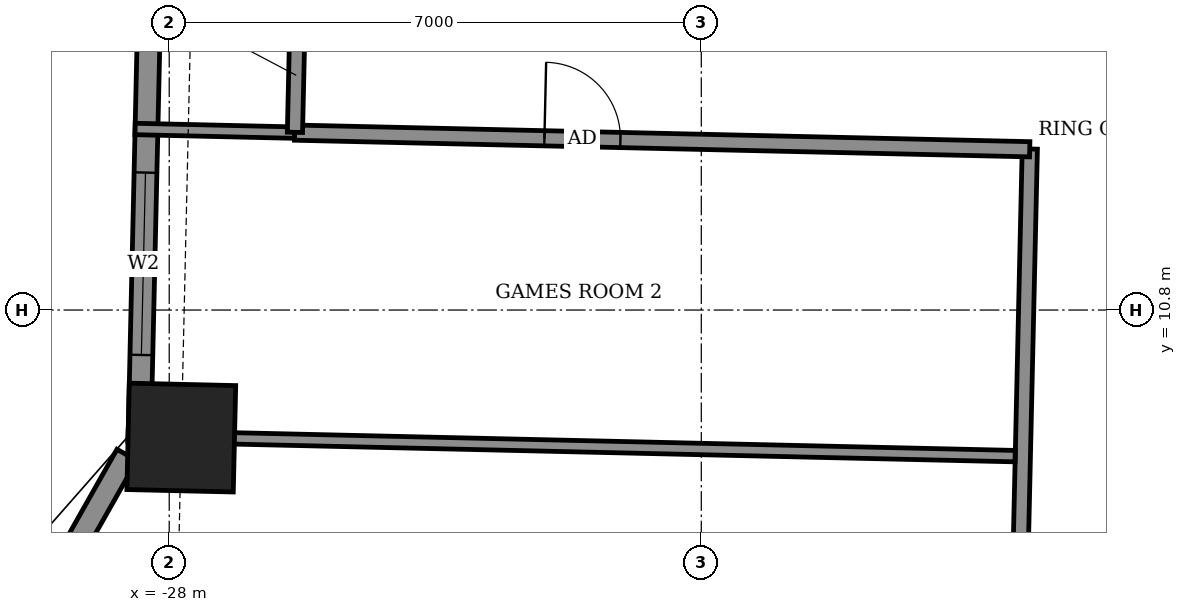
"""IFC4 building model, lengths in metres.
Left out: names, types, materials, properties, quantities, classifications, styles, units other than length and angle.
Written with IfcOpenShell. Run it as: python <this file> out.ifc"""

import sys

from ifc_helpers import new_model, si_unit, direction, frame, frame_2d, origin, origin_2d, place, context, subcontext, project, spatial, rectangle, extrude, element, fill, save


model = new_model("IFC4")
c1 = context("Model", 3, precision=1e-05, world=origin(), true_north=direction((0.0, 1.0)))
c2 = subcontext(c1, "Body", "Model", "MODEL_VIEW")
j1 = project(units=[si_unit("LENGTHUNIT", "METRE"), si_unit("PLANEANGLEUNIT", "RADIAN")], contexts=[c1])
p1 = place(None, origin())
s1 = spatial("IfcSite", under=j1, at=p1, CompositionType="ELEMENT")
p2 = place(p1, origin())
s2 = spatial("IfcBuilding", under=s1, at=p2, CompositionType="ELEMENT")
p3 = place(p2, frame((0.0, 0.0, 109.1)))
s3 = spatial("IfcBuildingStorey", under=s2, at=p3, CompositionType="ELEMENT", Elevation=109.1)
p4 = place(p3, frame((-27.841, 9.122, -0.55), z_axis=(0.0, 0.0, 1.0), x_axis=(-0.022671716894, -0.999742963593, 0.0)))
e1 = element("IfcColumn", 1, at=p4, inside=s3, PredefinedType="COLUMN", context=c2, shape_type="SweptSolid", body=[
    extrude(rectangle(XDim=1.4, YDim=1.4, at=origin_2d()), origin(), (0.0, 0.0, 1.0), 3.6),
])
p5 = place(p3, frame((-28.106, 21.707, 0.0), z_axis=(0.0, 0.0, 1.0), x_axis=(-0.022654663697, -0.999743350172, 0.0)))
e2 = element("IfcWall", 2, at=p5, inside=s3, PredefinedType="SOLIDWALL", context=c2, shape_type="SweptSolid", body=[
    extrude(rectangle(XDim=12.63, YDim=0.3, at=frame_2d((6.315, 0.0))), origin(), (0.0, 0.0, 1.0), 3.05),
])
p6 = place(p5, frame((2.625, 0.0, 0.0)))
e3 = element("IfcOpeningElement", 3, at=p6, cuts=e2, PredefinedType="OPENING", context=c2, shape_type="SweptSolid", body=[
    extrude(rectangle(XDim=1.5, YDim=2.4, at=frame_2d((0.75, 1.2))), frame((0.0, 0.16, 0.0), z_axis=(0.0, -1.0, 0.0), x_axis=(1.0, 0.0, 0.0)), (0.0, 0.0, 1.0), 0.32),
])
p7 = place(p5, frame((9.101, 0.0, 0.9)))
e4 = element("IfcOpeningElement", 4, at=p7, cuts=e2, PredefinedType="OPENING", context=c2, shape_type="SweptSolid", body=[
    extrude(rectangle(XDim=2.4, YDim=1.5, at=frame_2d((1.2, 0.75))), frame((0.0, 0.16, 0.0), z_axis=(0.0, -1.0, 0.0), x_axis=(1.0, 0.0, 0.0)), (0.0, 0.0, 1.0), 0.32),
])
p8 = place(p3, frame((-28.557, 8.894, 0.0), z_axis=(0.0, 0.0, 1.0), x_axis=(-0.492589172415, -0.8702619762, 0.0)))
e5 = element("IfcWall", 5, at=p8, inside=s3, PredefinedType="SOLIDWALL", context=c2, shape_type="SweptSolid", body=[
    extrude(rectangle(XDim=5.398, YDim=0.3, at=frame_2d((2.699, 0.0))), origin(), (0.0, 0.0, 1.0), 3.05),
])
p9 = place(p8, frame((2.008, 0.0, 0.9)))
e6 = element("IfcOpeningElement", 6, at=p9, cuts=e5, PredefinedType="OPENING", context=c2, shape_type="SweptSolid", body=[
    extrude(rectangle(XDim=1.2, YDim=1.5, at=frame_2d((0.6, 0.75))), frame((0.0, 0.16, 0.0), z_axis=(0.0, -1.0, 0.0), x_axis=(1.0, 0.0, 0.0)), (0.0, 0.0, 1.0), 0.32),
])
p10 = place(p3, frame((-17.247, -12.149, 0.0), z_axis=(0.0, 0.0, 1.0), x_axis=(0.022696191528, 0.999742408268, 0.0)))
e7 = element("IfcWall", 7, at=p10, inside=s3, PredefinedType="PARTITIONING", context=c2, shape_type="SweptSolid", body=[
    extrude(rectangle(XDim=25.074, YDim=0.2, at=frame_2d((12.537, 0.0))), origin(), (0.0, 0.0, 1.0), 3.05),
])
p11 = place(p10, frame((17.604, 0.0, 0.0)))
e8 = element("IfcOpeningElement", 8, at=p11, cuts=e7, PredefinedType="OPENING", context=c2, shape_type="SweptSolid", body=[
    extrude(rectangle(XDim=1.0, YDim=2.1, at=frame_2d((0.5, 1.05))), frame((0.0, 0.11, 0.0), z_axis=(0.0, -1.0, 0.0), x_axis=(1.0, 0.0, 0.0)), (0.0, 0.0, 1.0), 0.22),
])
p12 = place(p10, frame((13.376, 0.0, 0.0)))
e9 = element("IfcOpeningElement", 9, at=p12, cuts=e7, PredefinedType="OPENING", context=c2, shape_type="SweptSolid", body=[
    extrude(rectangle(XDim=1.0, YDim=2.1, at=frame_2d((0.5, 1.05))), frame((0.0, 0.11, 0.0), z_axis=(0.0, -1.0, 0.0), x_axis=(1.0, 0.0, 0.0)), (0.0, 0.0, 1.0), 0.22),
])
p13 = place(p10, frame((10.725, 0.0, 0.0)))
e10 = element("IfcOpeningElement", 10, at=p13, cuts=e7, PredefinedType="OPENING", context=c2, shape_type="SweptSolid", body=[
    extrude(rectangle(XDim=1.0, YDim=2.1, at=frame_2d((0.5, 1.05))), frame((0.0, 0.11, 0.0), z_axis=(0.0, -1.0, 0.0), x_axis=(1.0, 0.0, 0.0)), (0.0, 0.0, 1.0), 0.22),
])
p14 = place(p10, frame((8.225, 0.0, 0.0)))
e11 = element("IfcOpeningElement", 11, at=p14, cuts=e7, PredefinedType="OPENING", context=c2, shape_type="SweptSolid", body=[
    extrude(rectangle(XDim=0.9, YDim=2.1, at=frame_2d((0.45, 1.05))), frame((0.0, 0.11, 0.0), z_axis=(0.0, -1.0, 0.0), x_axis=(1.0, 0.0, 0.0)), (0.0, 0.0, 1.0), 0.22),
])
p15 = place(p10, frame((5.262, 0.0, 0.0)))
e12 = element("IfcOpeningElement", 12, at=p15, cuts=e7, PredefinedType="OPENING", context=c2, shape_type="SweptSolid", body=[
    extrude(rectangle(XDim=1.0, YDim=2.1, at=frame_2d((0.5, 1.05))), frame((0.0, 0.11, 0.0), z_axis=(0.0, -1.0, 0.0), x_axis=(1.0, 0.0, 0.0)), (0.0, 0.0, 1.0), 0.22),
])
p16 = place(p3, frame((-28.541, 9.143, 0.0), z_axis=(0.0, 0.0, 1.0), x_axis=(0.999742008279, -0.022713803786, 0.0)))
e13 = element("IfcWall", 13, at=p16, inside=s3, PredefinedType="PARTITIONING", context=c2, shape_type="SweptSolid", body=[
    extrude(rectangle(XDim=11.673, YDim=0.15, at=frame_2d((5.836, 0.0))), origin(), (0.0, 0.0, 1.0), 3.05),
])
p17 = place(p3, frame((-28.449, 13.182, 0.0), z_axis=(0.0, 0.0, 1.0), x_axis=(0.999741236023, -0.022747769011, 0.0)))
e14 = element("IfcWall", 14, at=p17, inside=s3, PredefinedType="PARTITIONING", context=c2, shape_type="SweptSolid", body=[
    extrude(rectangle(XDim=2.104, YDim=0.15, at=frame_2d((1.052, 0.0))), origin(), (0.0, 0.0, 1.0), 2.55),
])
p18 = place(p3, frame((-26.35, 13.134, 0.0), z_axis=(0.0, 0.0, 1.0), x_axis=(0.999743721339, -0.022638278294, 0.0)))
e15 = element("IfcWall", 15, at=p18, inside=s3, PredefinedType="PARTITIONING", context=c2, shape_type="SweptSolid", body=[
    extrude(rectangle(XDim=9.674, YDim=0.2, at=frame_2d((4.837, 0.0))), origin(), (0.0, 0.0, 1.0), 3.05),
])
p19 = place(p18, frame((3.287, 0.0, 0.0)))
e16 = element("IfcOpeningElement", 16, at=p19, cuts=e15, PredefinedType="OPENING", context=c2, shape_type="SweptSolid", body=[
    extrude(rectangle(XDim=1.0, YDim=2.1, at=frame_2d((0.5, 1.05))), frame((0.0, 0.11, 0.0), z_axis=(0.0, -1.0, 0.0), x_axis=(1.0, 0.0, 0.0)), (0.0, 0.0, 1.0), 0.22),
])
p20 = place(p3, frame((-26.346, 13.138, 0.0), z_axis=(0.0, 0.0, 1.0), x_axis=(0.022617910375, 0.999744182344, 0.0)))
e17 = element("IfcWall", 17, at=p20, inside=s3, PredefinedType="PARTITIONING", context=c2, shape_type="SweptSolid", body=[
    extrude(rectangle(XDim=1.5, YDim=0.2, at=frame_2d((0.75, 0.0))), origin(), (0.0, 0.0, 1.0), 3.05),
])
p21 = place(p3, frame((-26.316, 14.634, 0.0), z_axis=(0.0, 0.0, 1.0), x_axis=(0.999742734556, -0.02268181435, 0.0)))
e18 = element("IfcWall", 18, at=p21, inside=s3, PredefinedType="PARTITIONING", context=c2, shape_type="SweptSolid", body=[
    extrude(rectangle(XDim=50.708, YDim=0.2, at=frame_2d((25.354, 0.0))), origin(), (0.0, 0.0, 1.0), 3.05),
])
p22 = place(p21, frame((48.229, 0.0, 0.0)))
e19 = element("IfcOpeningElement", 19, at=p22, cuts=e18, PredefinedType="OPENING", context=c2, shape_type="SweptSolid", body=[
    extrude(rectangle(XDim=1.0, YDim=2.1, at=frame_2d((0.5, 1.05))), frame((0.0, 0.11, 0.0), z_axis=(0.0, -1.0, 0.0), x_axis=(1.0, 0.0, 0.0)), (0.0, 0.0, 1.0), 0.22),
])
p23 = place(p21, frame((43.6, 0.0, 0.0)))
e20 = element("IfcOpeningElement", 20, at=p23, cuts=e18, PredefinedType="OPENING", context=c2, shape_type="SweptSolid", body=[
    extrude(rectangle(XDim=0.9, YDim=2.1, at=frame_2d((0.45, 1.05))), frame((0.0, 0.11, 0.0), z_axis=(0.0, -1.0, 0.0), x_axis=(1.0, 0.0, 0.0)), (0.0, 0.0, 1.0), 0.22),
])
p24 = place(p21, frame((38.925, 0.0, 0.0)))
e21 = element("IfcOpeningElement", 21, at=p24, cuts=e18, PredefinedType="OPENING", context=c2, shape_type="SweptSolid", body=[
    extrude(rectangle(XDim=0.9, YDim=2.1, at=frame_2d((0.45, 1.05))), frame((0.0, 0.11, 0.0), z_axis=(0.0, -1.0, 0.0), x_axis=(1.0, 0.0, 0.0)), (0.0, 0.0, 1.0), 0.22),
])
p25 = place(p21, frame((36.9, 0.0, 0.0)))
e22 = element("IfcOpeningElement", 22, at=p25, cuts=e18, PredefinedType="OPENING", context=c2, shape_type="SweptSolid", body=[
    extrude(rectangle(XDim=0.9, YDim=2.1, at=frame_2d((0.45, 1.05))), frame((0.0, 0.11, 0.0), z_axis=(0.0, -1.0, 0.0), x_axis=(1.0, 0.0, 0.0)), (0.0, 0.0, 1.0), 0.22),
])
p26 = place(p21, frame((29.975, 0.0, 0.0)))
e23 = element("IfcOpeningElement", 23, at=p26, cuts=e18, PredefinedType="OPENING", context=c2, shape_type="SweptSolid", body=[
    extrude(rectangle(XDim=0.9, YDim=2.1, at=frame_2d((0.45, 1.05))), frame((0.0, 0.11, 0.0), z_axis=(0.0, -1.0, 0.0), x_axis=(1.0, 0.0, 0.0)), (0.0, 0.0, 1.0), 0.22),
])
p27 = place(p21, frame((27.9, 0.0, 0.0)))
e24 = element("IfcOpeningElement", 24, at=p27, cuts=e18, PredefinedType="OPENING", context=c2, shape_type="SweptSolid", body=[
    extrude(rectangle(XDim=0.9, YDim=2.1, at=frame_2d((0.45, 1.05))), frame((0.0, 0.11, 0.0), z_axis=(0.0, -1.0, 0.0), x_axis=(1.0, 0.0, 0.0)), (0.0, 0.0, 1.0), 0.22),
])
p28 = place(p21, frame((21.175, 0.0, 0.0)))
e25 = element("IfcOpeningElement", 25, at=p28, cuts=e18, PredefinedType="OPENING", context=c2, shape_type="SweptSolid", body=[
    extrude(rectangle(XDim=0.9, YDim=2.1, at=frame_2d((0.45, 1.05))), frame((0.0, 0.11, 0.0), z_axis=(0.0, -1.0, 0.0), x_axis=(1.0, 0.0, 0.0)), (0.0, 0.0, 1.0), 0.22),
])
p29 = place(p21, frame((19.25, 0.0, 0.0)))
e26 = element("IfcOpeningElement", 26, at=p29, cuts=e18, PredefinedType="OPENING", context=c2, shape_type="SweptSolid", body=[
    extrude(rectangle(XDim=0.9, YDim=2.1, at=frame_2d((0.45, 1.05))), frame((0.0, 0.11, 0.0), z_axis=(0.0, -1.0, 0.0), x_axis=(1.0, 0.0, 0.0)), (0.0, 0.0, 1.0), 0.22),
])
p30 = place(p21, frame((12.375, 0.0, 0.0)))
e27 = element("IfcOpeningElement", 27, at=p30, cuts=e18, PredefinedType="OPENING", context=c2, shape_type="SweptSolid", body=[
    extrude(rectangle(XDim=0.9, YDim=2.1, at=frame_2d((0.45, 1.05))), frame((0.0, 0.11, 0.0), z_axis=(0.0, -1.0, 0.0), x_axis=(1.0, 0.0, 0.0)), (0.0, 0.0, 1.0), 0.22),
])
p31 = place(p21, frame((10.225, 0.0, 0.0)))
e28 = element("IfcOpeningElement", 28, at=p31, cuts=e18, PredefinedType="OPENING", context=c2, shape_type="SweptSolid", body=[
    extrude(rectangle(XDim=0.9, YDim=2.1, at=frame_2d((0.45, 1.05))), frame((0.0, 0.11, 0.0), z_axis=(0.0, -1.0, 0.0), x_axis=(1.0, 0.0, 0.0)), (0.0, 0.0, 1.0), 0.22),
])
p32 = place(p21, frame((0.85, 0.0, 0.0)))
e29 = element("IfcOpeningElement", 29, at=p32, cuts=e18, PredefinedType="OPENING", context=c2, shape_type="SweptSolid", body=[
    extrude(rectangle(XDim=1.0, YDim=2.1, at=frame_2d((0.5, 1.05))), frame((0.0, 0.11, 0.0), z_axis=(0.0, -1.0, 0.0), x_axis=(1.0, 0.0, 0.0)), (0.0, 0.0, 1.0), 0.22),
])
p33 = place(p21, frame((5.55, 0.0, 0.0)))
e30 = element("IfcOpeningElement", 30, at=p33, cuts=e18, PredefinedType="OPENING", context=c2, shape_type="SweptSolid", body=[
    extrude(rectangle(XDim=0.9, YDim=2.1, at=frame_2d((0.45, 1.05))), frame((0.0, 0.11, 0.0), z_axis=(0.0, -1.0, 0.0), x_axis=(1.0, 0.0, 0.0)), (0.0, 0.0, 1.0), 0.22),
])
p34 = place(p7, origin())
e31 = element("IfcWindow", 31, at=p34, inside=s3, PartitioningType="DOUBLE_PANEL_VERTICAL", PredefinedType="WINDOW", context=c2, shape_type="SweptSolid", body=[
    extrude(rectangle(XDim=2.4, YDim=1.5, at=frame_2d((1.2, 0.75))), frame((0.0, 0.03, 0.0), z_axis=(0.0, -1.0, 0.0), x_axis=(1.0, 0.0, 0.0)), (0.0, 0.0, 1.0), 0.06),
])
fill(e4, e31)
p35 = place(p19, origin())
e32 = element("IfcDoor", 32, at=p35, inside=s3, OperationType="SINGLE_SWING_LEFT", PredefinedType="DOOR", context=c2, shape_type="SweptSolid", body=[
    extrude(rectangle(XDim=1.0, YDim=2.1, at=frame_2d((0.5, 1.05))), frame((0.0, 0.025, 0.0), z_axis=(0.0, -1.0, 0.0), x_axis=(1.0, 0.0, 0.0)), (0.0, 0.0, 1.0), 0.05),
])
fill(e16, e32)
save(model, sys.argv[1])
